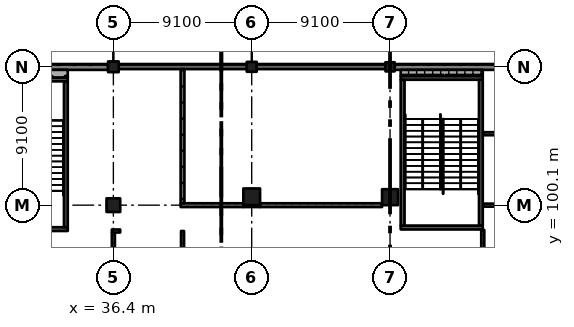
"""IFC4 building model, lengths in metres.
Left out: names, types, materials, properties, quantities, classifications, styles, units other than length and angle.
Written with IfcOpenShell. Run it as: python <this file> out.ifc"""

import sys

from ifc_helpers import new_model, si_unit, direction, frame, frame_2d, origin, origin_2d, place, context, subcontext, project, spatial, rectangle, extrude, element, fill, save


model = new_model("IFC4")
c1 = context("Model", 3, precision=1e-05, world=origin(), true_north=direction((0.0, 1.0)))
c2 = subcontext(c1, "Body", "Model", "MODEL_VIEW")
j1 = project(units=[si_unit("LENGTHUNIT", "METRE"), si_unit("PLANEANGLEUNIT", "RADIAN")], contexts=[c1])
p1 = place(None, origin())
s1 = spatial("IfcSite", under=j1, at=p1, CompositionType="ELEMENT")
p2 = place(p1, origin())
s2 = spatial("IfcBuilding", under=s1, at=p2, CompositionType="ELEMENT")
p3 = place(p2, origin())
s3 = spatial("IfcBuildingStorey", under=s2, at=p3, CompositionType="ELEMENT", Elevation=0.0)
p4 = place(p3, frame((36.4, 100.1, -0.4), z_axis=(0.0, 0.0, 1.0), x_axis=(1.0, 0.0, 0.0)))
e1 = element("IfcColumn", 1, at=p4, inside=s3, PredefinedType="COLUMN", context=c2, shape_type="SweptSolid", body=[
    extrude(rectangle(XDim=0.9, YDim=0.9, at=origin_2d()), origin(), (0.0, 0.0, 1.0), 6.77),
])
p5 = place(p3, frame((36.4, 109.2, -0.4), z_axis=(0.0, 0.0, 1.0), x_axis=(1.0, 0.0, 0.0)))
e2 = element("IfcColumn", 2, at=p5, inside=s3, PredefinedType="COLUMN", context=c2, shape_type="SweptSolid", body=[
    extrude(rectangle(XDim=0.7, YDim=0.7, at=origin_2d()), origin(), (0.0, 0.0, 1.0), 6.77),
])
p6 = place(p3, frame((45.5, 100.65, -0.4), z_axis=(0.0, 0.0, 1.0), x_axis=(1.0, 0.0, 0.0)))
e3 = element("IfcColumn", 3, at=p6, inside=s3, PredefinedType="COLUMN", context=c2, shape_type="SweptSolid", body=[
    extrude(rectangle(XDim=1.1, YDim=1.1, at=origin_2d()), origin(), (0.0, 0.0, 1.0), 6.77),
])
p7 = place(p3, frame((45.5, 109.2, -0.4), z_axis=(0.0, 0.0, 1.0), x_axis=(1.0, 0.0, 0.0)))
e4 = element("IfcColumn", 4, at=p7, inside=s3, PredefinedType="COLUMN", context=c2, shape_type="SweptSolid", body=[
    extrude(rectangle(XDim=0.65, YDim=0.65, at=origin_2d()), origin(), (0.0, 0.0, 1.0), 6.77),
])
p8 = place(p3, frame((54.6, 100.625, -0.4), z_axis=(0.0, 0.0, 1.0), x_axis=(1.0, 0.0, 0.0)))
e5 = element("IfcColumn", 5, at=p8, inside=s3, PredefinedType="COLUMN", context=c2, shape_type="SweptSolid", body=[
    extrude(rectangle(XDim=1.05, YDim=1.05, at=origin_2d()), origin(), (0.0, 0.0, 1.0), 6.77),
])
p9 = place(p3, frame((54.6, 109.2, -0.4), z_axis=(0.0, 0.0, 1.0), x_axis=(1.0, 0.0, 0.0)))
e6 = element("IfcColumn", 6, at=p9, inside=s3, PredefinedType="COLUMN", context=c2, shape_type="SweptSolid", body=[
    extrude(rectangle(XDim=0.6, YDim=0.6, at=origin_2d()), origin(), (0.0, 0.0, 1.0), 6.77),
])
p10 = place(p3, frame((33.4, 98.525, -0.4), z_axis=(0.0, 0.0, 1.0), x_axis=(-1.0, 0.0, 0.0)))
e7 = element("IfcWall", 7, at=p10, inside=s3, PredefinedType="SHEAR", context=c2, shape_type="SweptSolid", body=[
    extrude(rectangle(XDim=5.4, YDim=0.25, at=frame_2d((2.7, 0.0))), origin(), (0.0, 0.0, 1.0), 6.77),
])
p11 = place(p10, frame((1.5, 0.0, 0.4)))
e8 = element("IfcOpeningElement", 8, at=p11, cuts=e7, PredefinedType="OPENING", context=c2, shape_type="SweptSolid", body=[
    extrude(rectangle(XDim=2.4, YDim=2.1, at=frame_2d((1.2, 1.05))), frame((0.0, 0.135, 0.0), z_axis=(0.0, -1.0, 0.0), x_axis=(1.0, 0.0, 0.0)), (0.0, 0.0, 1.0), 0.27),
])
p12 = place(p3, frame((33.4, 108.375, -0.4), z_axis=(0.0, 0.0, 1.0), x_axis=(-1.0, 0.0, 0.0)))
e9 = element("IfcWall", 9, at=p12, inside=s3, PredefinedType="SHEAR", context=c2, shape_type="SweptSolid", body=[
    extrude(rectangle(XDim=5.4, YDim=0.25, at=frame_2d((2.7, 0.0))), origin(), (0.0, 0.0, 1.0), 6.77),
])
p13 = place(p3, frame((33.275, 108.25, -0.4), z_axis=(0.0, 0.0, 1.0), x_axis=(0.0, -1.0, 0.0)))
e10 = element("IfcWall", 10, at=p13, inside=s3, PredefinedType="SHEAR", context=c2, shape_type="SweptSolid", body=[
    extrude(rectangle(XDim=9.6, YDim=0.25, at=frame_2d((4.8, 0.0))), origin(), (0.0, 0.0, 1.0), 6.77),
])
p14 = place(p13, frame((7.95, 0.0, 0.4)))
e11 = element("IfcOpeningElement", 11, at=p14, cuts=e10, PredefinedType="OPENING", context=c2, shape_type="SweptSolid", body=[
    extrude(rectangle(XDim=1.2, YDim=2.1, at=frame_2d((0.6, 1.05))), frame((0.0, 0.135, 0.0), z_axis=(0.0, -1.0, 0.0), x_axis=(1.0, 0.0, 0.0)), (0.0, 0.0, 1.0), 0.27),
])
p15 = place(p3, frame((60.7, 98.625, -0.4), z_axis=(0.0, 0.0, 1.0), x_axis=(-1.0, 0.0, 0.0)))
e12 = element("IfcWall", 12, at=p15, inside=s3, PredefinedType="SHEAR", context=c2, shape_type="SweptSolid", body=[
    extrude(rectangle(XDim=5.4, YDim=0.25, at=frame_2d((2.7, 0.0))), origin(), (0.0, 0.0, 1.0), 6.77),
])
p16 = place(p15, frame((1.5, 0.0, 0.4)))
e13 = element("IfcOpeningElement", 13, at=p16, cuts=e12, PredefinedType="OPENING", context=c2, shape_type="SweptSolid", body=[
    extrude(rectangle(XDim=2.4, YDim=2.1, at=frame_2d((1.2, 1.05))), frame((0.0, 0.135, 0.0), z_axis=(0.0, -1.0, 0.0), x_axis=(1.0, 0.0, 0.0)), (0.0, 0.0, 1.0), 0.27),
])
p17 = place(p3, frame((60.7, 108.475, -0.4), z_axis=(0.0, 0.0, 1.0), x_axis=(-1.0, 0.0, 0.0)))
e14 = element("IfcWall", 14, at=p17, inside=s3, PredefinedType="SHEAR", context=c2, shape_type="SweptSolid", body=[
    extrude(rectangle(XDim=5.4, YDim=0.25, at=frame_2d((2.7, 0.0))), origin(), (0.0, 0.0, 1.0), 6.77),
])
for number, where, z_axis, x_axis in (
    (15, (55.425, 108.35, -0.4), (0.0, 0.0, 1.0), (0.0, -1.0, 0.0)),
    (16, (60.575, 108.35, -0.4), (0.0, 0.0, 1.0), (0.0, -1.0, 0.0)),
):
    element("IfcWall", number, at=place(p3, frame(where, z_axis=z_axis, x_axis=x_axis)), inside=s3, PredefinedType="SHEAR", context=c2, shape_type="SweptSolid", body=[
        extrude(rectangle(XDim=9.6, YDim=0.25, at=frame_2d((4.8, 0.0))), origin(), (0.0, 0.0, 1.0), 6.77),
    ])
p18 = place(p3, frame((63.375, 109.175, 0.0), z_axis=(0.0, 0.0, 1.0), x_axis=(-1.0, 0.0, 0.0)))
e17 = element("IfcWall", 17, at=p18, inside=s3, PredefinedType="SOLIDWALL", context=c2, shape_type="SweptSolid", body=[
    extrude(rectangle(XDim=8.475, YDim=0.35, at=frame_2d((4.238, 0.0))), origin(), (0.0, 0.0, 1.0), 5.27),
])
p19 = place(p3, frame((54.3, 109.2, 0.0), z_axis=(0.0, 0.0, 1.0), x_axis=(-1.0, 0.0, 0.0)))
e18 = element("IfcWall", 18, at=p19, inside=s3, PredefinedType="SOLIDWALL", context=c2, shape_type="SweptSolid", body=[
    extrude(rectangle(XDim=8.475, YDim=0.3, at=frame_2d((4.238, 0.0))), origin(), (0.0, 0.0, 1.0), 5.27),
])
p20 = place(p19, frame((0.712, 0.0, 1.0)))
e19 = element("IfcOpeningElement", 19, at=p20, cuts=e18, PredefinedType="OPENING", context=c2, shape_type="SweptSolid", body=[
    extrude(rectangle(XDim=1.8, YDim=1.2, at=frame_2d((0.9, 0.6))), frame((0.0, 0.16, 0.0), z_axis=(0.0, -1.0, 0.0), x_axis=(1.0, 0.0, 0.0)), (0.0, 0.0, 1.0), 0.32),
])
p21 = place(p19, frame((3.337, 0.0, 1.0)))
e20 = element("IfcOpeningElement", 20, at=p21, cuts=e18, PredefinedType="OPENING", context=c2, shape_type="SweptSolid", body=[
    extrude(rectangle(XDim=1.8, YDim=1.2, at=frame_2d((0.9, 0.6))), frame((0.0, 0.16, 0.0), z_axis=(0.0, -1.0, 0.0), x_axis=(1.0, 0.0, 0.0)), (0.0, 0.0, 1.0), 0.32),
])
p22 = place(p19, frame((5.962, 0.0, 1.0)))
e21 = element("IfcOpeningElement", 21, at=p22, cuts=e18, PredefinedType="OPENING", context=c2, shape_type="SweptSolid", body=[
    extrude(rectangle(XDim=1.8, YDim=1.2, at=frame_2d((0.9, 0.6))), frame((0.0, 0.16, 0.0), z_axis=(0.0, -1.0, 0.0), x_axis=(1.0, 0.0, 0.0)), (0.0, 0.0, 1.0), 0.32),
])
p23 = place(p3, frame((45.175, 109.2, 0.0), z_axis=(0.0, 0.0, 1.0), x_axis=(-1.0, 0.0, 0.0)))
e22 = element("IfcWall", 22, at=p23, inside=s3, PredefinedType="SOLIDWALL", context=c2, shape_type="SweptSolid", body=[
    extrude(rectangle(XDim=8.425, YDim=0.3, at=frame_2d((4.212, 0.0))), origin(), (0.0, 0.0, 1.0), 5.27),
])
p24 = place(p23, frame((5.3, 0.0, 0.0)))
e23 = element("IfcOpeningElement", 23, at=p24, cuts=e22, PredefinedType="OPENING", context=c2, shape_type="SweptSolid", body=[
    extrude(rectangle(XDim=1.8, YDim=2.4, at=frame_2d((0.9, 1.2))), frame((0.0, 0.16, 0.0), z_axis=(0.0, -1.0, 0.0), x_axis=(1.0, 0.0, 0.0)), (0.0, 0.0, 1.0), 0.32),
])
p25 = place(p23, frame((1.212, 0.0, 1.0)))
e24 = element("IfcOpeningElement", 24, at=p25, cuts=e22, PredefinedType="OPENING", context=c2, shape_type="SweptSolid", body=[
    extrude(rectangle(XDim=1.8, YDim=1.2, at=frame_2d((0.9, 0.6))), frame((0.0, 0.16, 0.0), z_axis=(0.0, -1.0, 0.0), x_axis=(1.0, 0.0, 0.0)), (0.0, 0.0, 1.0), 0.32),
])
p26 = place(p3, frame((36.05, 109.175, 0.0), z_axis=(0.0, 0.0, 1.0), x_axis=(-1.0, 0.0, 0.0)))
e25 = element("IfcWall", 25, at=p26, inside=s3, PredefinedType="SOLIDWALL", context=c2, shape_type="SweptSolid", body=[
    extrude(rectangle(XDim=8.475, YDim=0.35, at=frame_2d((4.238, 0.0))), origin(), (0.0, 0.0, 1.0), 5.27),
])
p27 = place(p26, frame((0.4, 0.0, 0.0)))
e26 = element("IfcOpeningElement", 26, at=p27, cuts=e25, PredefinedType="OPENING", context=c2, shape_type="SweptSolid", body=[
    extrude(rectangle(XDim=2.1, YDim=2.4, at=frame_2d((1.05, 1.2))), frame((0.0, 0.185, 0.0), z_axis=(0.0, -1.0, 0.0), x_axis=(1.0, 0.0, 0.0)), (0.0, 0.0, 1.0), 0.37),
])
p28 = place(p3, frame((28.0, 108.75, 0.0), z_axis=(0.0, 0.0, 1.0), x_axis=(1.0, 0.0, 0.0)))
e27 = element("IfcWall", 27, at=p28, inside=s3, PredefinedType="SOLIDWALL", context=c2, shape_type="SweptSolid", body=[
    extrude(rectangle(XDim=5.4, YDim=0.5, at=frame_2d((2.7, 0.0))), origin(), (0.0, 0.0, 1.0), 6.37),
])
p29 = place(p3, frame((55.3, 108.8, 0.0), z_axis=(0.0, 0.0, 1.0), x_axis=(1.0, 0.0, 0.0)))
e28 = element("IfcWall", 28, at=p29, inside=s3, PredefinedType="SOLIDWALL", context=c2, shape_type="SweptSolid", body=[
    extrude(rectangle(XDim=5.4, YDim=0.4, at=frame_2d((2.7, 0.0))), origin(), (0.0, 0.0, 1.0), 6.02),
])
p30 = place(p3, frame((36.4, 98.3, 0.0), z_axis=(0.0, 0.0, 1.0), x_axis=(0.0, -1.0, 0.0)))
e29 = element("IfcWall", 29, at=p30, inside=s3, PredefinedType="PARTITIONING", context=c2, shape_type="SweptSolid", body=[
    extrude(rectangle(XDim=6.825, YDim=0.2, at=frame_2d((3.413, 0.0))), origin(), (0.0, 0.0, 1.0), 5.32),
])
p31 = place(p30, frame((0.85, 0.0, 0.0)))
e30 = element("IfcOpeningElement", 30, at=p31, cuts=e29, PredefinedType="OPENING", context=c2, shape_type="SweptSolid", body=[
    extrude(rectangle(XDim=1.8, YDim=2.4, at=frame_2d((0.9, 1.2))), frame((0.0, 0.11, 0.0), z_axis=(0.0, -1.0, 0.0), x_axis=(1.0, 0.0, 0.0)), (0.0, 0.0, 1.0), 0.22),
])
p32 = place(p30, frame((4.25, 0.0, 0.0)))
e31 = element("IfcOpeningElement", 31, at=p32, cuts=e29, PredefinedType="OPENING", context=c2, shape_type="SweptSolid", body=[
    extrude(rectangle(XDim=1.8, YDim=2.4, at=frame_2d((0.9, 1.2))), frame((0.0, 0.11, 0.0), z_axis=(0.0, -1.0, 0.0), x_axis=(1.0, 0.0, 0.0)), (0.0, 0.0, 1.0), 0.22),
])
p33 = place(p3, frame((36.85, 98.4, 0.0), z_axis=(0.0, 0.0, 1.0), x_axis=(-1.0, 0.0, 0.0)))
e32 = element("IfcWall", 32, at=p33, inside=s3, PredefinedType="PARTITIONING", context=c2, shape_type="SweptSolid", body=[
    extrude(rectangle(XDim=0.55, YDim=0.2, at=frame_2d((0.275, 0.0))), origin(), (0.0, 0.0, 1.0), 6.02),
])
p34 = place(p3, frame((40.825, 100.1, 0.0), z_axis=(0.0, 0.0, 1.0), x_axis=(1.0, 0.0, 0.0)))
e33 = element("IfcWall", 33, at=p34, inside=s3, PredefinedType="SOLIDWALL", context=c2, shape_type="SweptSolid", body=[
    extrude(rectangle(XDim=4.125, YDim=0.25, at=frame_2d((2.062, 0.0))), origin(), (0.0, 0.0, 1.0), 5.32),
])
p35 = place(p3, frame((40.95, 98.4, 0.0), z_axis=(0.0, 0.0, 1.0), x_axis=(0.0, -1.0, 0.0)))
e34 = element("IfcWall", 34, at=p35, inside=s3, PredefinedType="PARTITIONING", context=c2, shape_type="SweptSolid", body=[
    extrude(rectangle(XDim=7.3, YDim=0.2, at=frame_2d((3.65, 0.0))), origin(), (0.0, 0.0, 1.0), 6.02),
])
p36 = place(p35, frame((0.95, 0.0, 0.0)))
e35 = element("IfcOpeningElement", 35, at=p36, cuts=e34, PredefinedType="OPENING", context=c2, shape_type="SweptSolid", body=[
    extrude(rectangle(XDim=1.8, YDim=2.4, at=frame_2d((0.9, 1.2))), frame((0.0, 0.11, 0.0), z_axis=(0.0, -1.0, 0.0), x_axis=(1.0, 0.0, 0.0)), (0.0, 0.0, 1.0), 0.22),
])
p37 = place(p35, frame((4.55, 0.0, 0.0)))
e36 = element("IfcOpeningElement", 36, at=p37, cuts=e34, PredefinedType="OPENING", context=c2, shape_type="SweptSolid", body=[
    extrude(rectangle(XDim=1.8, YDim=2.4, at=frame_2d((0.9, 1.2))), frame((0.0, 0.11, 0.0), z_axis=(0.0, -1.0, 0.0), x_axis=(1.0, 0.0, 0.0)), (0.0, 0.0, 1.0), 0.22),
])
p38 = place(p3, frame((40.95, 109.05, 0.0), z_axis=(0.0, 0.0, 1.0), x_axis=(0.0, -1.0, 0.0)))
e37 = element("IfcWall", 37, at=p38, inside=s3, PredefinedType="SOLIDWALL", context=c2, shape_type="SweptSolid", body=[
    extrude(rectangle(XDim=8.825, YDim=0.25, at=frame_2d((4.413, 0.0))), origin(), (0.0, 0.0, 1.0), 6.02),
])
p39 = place(p3, frame((60.7, 98.47, 0.0), z_axis=(0.0, 0.0, 1.0), x_axis=(0.0, -1.0, 0.0)))
e38 = element("IfcWall", 38, at=p39, inside=s3, PredefinedType="PARTITIONING", context=c2, shape_type="SweptSolid", body=[
    extrude(rectangle(XDim=7.37, YDim=0.2, at=frame_2d((3.685, 0.0))), origin(), (0.0, 0.0, 1.0), 6.02),
])
p40 = place(p39, frame((2.15, 0.0, 0.0)))
e39 = element("IfcOpeningElement", 39, at=p40, cuts=e38, PredefinedType="OPENING", context=c2, shape_type="SweptSolid", body=[
    extrude(rectangle(XDim=3.0, YDim=2.4, at=frame_2d((1.5, 1.2))), frame((0.0, 0.11, 0.0), z_axis=(0.0, -1.0, 0.0), x_axis=(1.0, 0.0, 0.0)), (0.0, 0.0, 1.0), 0.22),
])
p41 = place(p3, frame((60.73, 100.1, 0.0), z_axis=(0.0, 0.0, 1.0), x_axis=(1.0, 0.0, 0.0)))
e40 = element("IfcWall", 40, at=p41, inside=s3, PredefinedType="PARTITIONING", context=c2, shape_type="SweptSolid", body=[
    extrude(rectangle(XDim=2.42, YDim=0.2, at=frame_2d((1.21, 0.0))), origin(), (0.0, 0.0, 1.0), 5.57),
])
p42 = place(p41, frame((0.55, 0.0, 0.0)))
e41 = element("IfcOpeningElement", 41, at=p42, cuts=e40, PredefinedType="OPENING", context=c2, shape_type="SweptSolid", body=[
    extrude(rectangle(XDim=1.8, YDim=2.4, at=frame_2d((0.9, 1.2))), frame((0.0, 0.11, 0.0), z_axis=(0.0, -1.0, 0.0), x_axis=(1.0, 0.0, 0.0)), (0.0, 0.0, 1.0), 0.22),
])
p43 = place(p3, frame((60.73, 104.8, 0.0), z_axis=(0.0, 0.0, 1.0), x_axis=(1.0, 0.0, 0.0)))
e42 = element("IfcWall", 42, at=p43, inside=s3, PredefinedType="PARTITIONING", context=c2, shape_type="SweptSolid", body=[
    extrude(rectangle(XDim=21.84, YDim=0.2, at=frame_2d((10.92, 0.0))), origin(), (0.0, 0.0, 1.0), 6.02),
])
p44 = place(p43, frame((0.65, 0.0, 0.0)))
e43 = element("IfcOpeningElement", 43, at=p44, cuts=e42, PredefinedType="OPENING", context=c2, shape_type="SweptSolid", body=[
    extrude(rectangle(XDim=1.8, YDim=2.4, at=frame_2d((0.9, 1.2))), frame((0.0, 0.11, 0.0), z_axis=(0.0, -1.0, 0.0), x_axis=(1.0, 0.0, 0.0)), (0.0, 0.0, 1.0), 0.22),
])
p45 = place(p43, frame((3.75, 0.0, 0.0)))
e44 = element("IfcOpeningElement", 44, at=p45, cuts=e42, PredefinedType="OPENING", context=c2, shape_type="SweptSolid", body=[
    extrude(rectangle(XDim=1.8, YDim=2.4, at=frame_2d((0.9, 1.2))), frame((0.0, 0.11, 0.0), z_axis=(0.0, -1.0, 0.0), x_axis=(1.0, 0.0, 0.0)), (0.0, 0.0, 1.0), 0.22),
])
p46 = place(p43, frame((6.95, 0.0, 0.0)))
e45 = element("IfcOpeningElement", 45, at=p46, cuts=e42, PredefinedType="OPENING", context=c2, shape_type="SweptSolid", body=[
    extrude(rectangle(XDim=1.8, YDim=2.4, at=frame_2d((0.9, 1.2))), frame((0.0, 0.11, 0.0), z_axis=(0.0, -1.0, 0.0), x_axis=(1.0, 0.0, 0.0)), (0.0, 0.0, 1.0), 0.22),
])
p47 = place(p43, frame((10.05, 0.0, 0.0)))
e46 = element("IfcOpeningElement", 46, at=p47, cuts=e42, PredefinedType="OPENING", context=c2, shape_type="SweptSolid", body=[
    extrude(rectangle(XDim=1.8, YDim=2.4, at=frame_2d((0.9, 1.2))), frame((0.0, 0.11, 0.0), z_axis=(0.0, -1.0, 0.0), x_axis=(1.0, 0.0, 0.0)), (0.0, 0.0, 1.0), 0.22),
])
p48 = place(p43, frame((13.15, 0.0, 0.0)))
e47 = element("IfcOpeningElement", 47, at=p48, cuts=e42, PredefinedType="OPENING", context=c2, shape_type="SweptSolid", body=[
    extrude(rectangle(XDim=1.8, YDim=2.4, at=frame_2d((0.9, 1.2))), frame((0.0, 0.11, 0.0), z_axis=(0.0, -1.0, 0.0), x_axis=(1.0, 0.0, 0.0)), (0.0, 0.0, 1.0), 0.22),
])
p49 = place(p43, frame((16.25, 0.0, 0.0)))
e48 = element("IfcOpeningElement", 48, at=p49, cuts=e42, PredefinedType="OPENING", context=c2, shape_type="SweptSolid", body=[
    extrude(rectangle(XDim=1.8, YDim=2.4, at=frame_2d((0.9, 1.2))), frame((0.0, 0.11, 0.0), z_axis=(0.0, -1.0, 0.0), x_axis=(1.0, 0.0, 0.0)), (0.0, 0.0, 1.0), 0.22),
])
p50 = place(p43, frame((19.35, 0.0, 0.0)))
e49 = element("IfcOpeningElement", 49, at=p50, cuts=e42, PredefinedType="OPENING", context=c2, shape_type="SweptSolid", body=[
    extrude(rectangle(XDim=1.8, YDim=2.4, at=frame_2d((0.9, 1.2))), frame((0.0, 0.11, 0.0), z_axis=(0.0, -1.0, 0.0), x_axis=(1.0, 0.0, 0.0)), (0.0, 0.0, 1.0), 0.22),
])
p51 = place(p3, frame((44.95, 100.1, 0.0), z_axis=(0.0, 0.0, 1.0), x_axis=(1.0, 0.0, 0.0)))
e50 = element("IfcWall", 50, at=p51, inside=s3, PredefinedType="SOLIDWALL", context=c2, shape_type="SweptSolid", body=[
    extrude(rectangle(XDim=1.1, YDim=0.25, at=frame_2d((0.55, 0.0))), origin(), (0.0, 0.0, 1.0), 6.02),
])
p52 = place(p3, frame((46.05, 100.1, 0.0), z_axis=(0.0, 0.0, 1.0), x_axis=(1.0, 0.0, 0.0)))
e51 = element("IfcWall", 51, at=p52, inside=s3, PredefinedType="SOLIDWALL", context=c2, shape_type="SweptSolid", body=[
    extrude(rectangle(XDim=8.025, YDim=0.25, at=frame_2d((4.012, 0.0))), origin(), (0.0, 0.0, 1.0), 5.32),
])
p53 = place(p52, frame((0.525, 0.0, 0.0)))
e52 = element("IfcOpeningElement", 52, at=p53, cuts=e51, PredefinedType="OPENING", context=c2, shape_type="SweptSolid", body=[
    extrude(rectangle(XDim=1.8, YDim=2.1, at=frame_2d((0.9, 1.05))), frame((0.0, 0.135, 0.0), z_axis=(0.0, -1.0, 0.0), x_axis=(1.0, 0.0, 0.0)), (0.0, 0.0, 1.0), 0.27),
])
p54 = place(p20, origin())
e53 = element("IfcWindow", 53, at=p54, inside=s3, PartitioningType="SINGLE_PANEL", PredefinedType="WINDOW", context=c2, shape_type="SweptSolid", body=[
    extrude(rectangle(XDim=1.8, YDim=1.2, at=frame_2d((0.9, 0.6))), frame((0.0, 0.03, 0.0), z_axis=(0.0, -1.0, 0.0), x_axis=(1.0, 0.0, 0.0)), (0.0, 0.0, 1.0), 0.06),
])
fill(e19, e53)
p55 = place(p21, origin())
e54 = element("IfcWindow", 54, at=p55, inside=s3, PartitioningType="SINGLE_PANEL", PredefinedType="WINDOW", context=c2, shape_type="SweptSolid", body=[
    extrude(rectangle(XDim=1.8, YDim=1.2, at=frame_2d((0.9, 0.6))), frame((0.0, 0.03, 0.0), z_axis=(0.0, -1.0, 0.0), x_axis=(1.0, 0.0, 0.0)), (0.0, 0.0, 1.0), 0.06),
])
fill(e20, e54)
p56 = place(p22, origin())
e55 = element("IfcWindow", 55, at=p56, inside=s3, PartitioningType="SINGLE_PANEL", PredefinedType="WINDOW", context=c2, shape_type="SweptSolid", body=[
    extrude(rectangle(XDim=1.8, YDim=1.2, at=frame_2d((0.9, 0.6))), frame((0.0, 0.03, 0.0), z_axis=(0.0, -1.0, 0.0), x_axis=(1.0, 0.0, 0.0)), (0.0, 0.0, 1.0), 0.06),
])
fill(e21, e55)
p57 = place(p24, frame((1.8, 0.0, 0.0), z_axis=(0.0, 0.0, 1.0), x_axis=(-1.0, 0.0, 0.0)))
e56 = element("IfcDoor", 56, at=p57, inside=s3, OperationType="DOUBLE_DOOR_SINGLE_SWING", PredefinedType="DOOR", context=c2, shape_type="SweptSolid", body=[
    extrude(rectangle(XDim=1.8, YDim=2.4, at=frame_2d((0.9, 1.2))), frame((0.0, 0.025, 0.0), z_axis=(0.0, -1.0, 0.0), x_axis=(1.0, 0.0, 0.0)), (0.0, 0.0, 1.0), 0.05),
])
fill(e23, e56)
p58 = place(p25, origin())
e57 = element("IfcWindow", 57, at=p58, inside=s3, PartitioningType="SINGLE_PANEL", PredefinedType="WINDOW", context=c2, shape_type="SweptSolid", body=[
    extrude(rectangle(XDim=1.8, YDim=1.2, at=frame_2d((0.9, 0.6))), frame((0.0, 0.03, 0.0), z_axis=(0.0, -1.0, 0.0), x_axis=(1.0, 0.0, 0.0)), (0.0, 0.0, 1.0), 0.06),
])
fill(e24, e57)
p59 = place(p27, frame((2.1, 0.0, 0.0), z_axis=(0.0, 0.0, 1.0), x_axis=(-1.0, 0.0, 0.0)))
e58 = element("IfcDoor", 58, at=p59, inside=s3, OperationType="DOUBLE_DOOR_SINGLE_SWING", PredefinedType="DOOR", context=c2, shape_type="SweptSolid", body=[
    extrude(rectangle(XDim=2.1, YDim=2.4, at=frame_2d((1.05, 1.2))), frame((0.0, 0.025, 0.0), z_axis=(0.0, -1.0, 0.0), x_axis=(1.0, 0.0, 0.0)), (0.0, 0.0, 1.0), 0.05),
])
fill(e26, e58)
p60 = place(p53, origin())
e59 = element("IfcDoor", 59, at=p60, inside=s3, OperationType="DOUBLE_DOOR_SINGLE_SWING", PredefinedType="DOOR", context=c2, shape_type="SweptSolid", body=[
    extrude(rectangle(XDim=1.8, YDim=2.1, at=frame_2d((0.9, 1.05))), frame((0.0, 0.025, 0.0), z_axis=(0.0, -1.0, 0.0), x_axis=(1.0, 0.0, 0.0)), (0.0, 0.0, 1.0), 0.05),
])
fill(e52, e59)
p61 = place(p31, origin())
e60 = element("IfcDoor", 60, at=p61, inside=s3, OperationType="DOUBLE_DOOR_SINGLE_SWING", PredefinedType="DOOR", context=c2, shape_type="SweptSolid", body=[
    extrude(rectangle(XDim=1.8, YDim=2.4, at=frame_2d((0.9, 1.2))), frame((0.0, 0.025, 0.0), z_axis=(0.0, -1.0, 0.0), x_axis=(1.0, 0.0, 0.0)), (0.0, 0.0, 1.0), 0.05),
])
fill(e30, e60)
p62 = place(p36, origin())
e61 = element("IfcDoor", 61, at=p62, inside=s3, OperationType="DOUBLE_DOOR_SINGLE_SWING", PredefinedType="DOOR", context=c2, shape_type="SweptSolid", body=[
    extrude(rectangle(XDim=1.8, YDim=2.4, at=frame_2d((0.9, 1.2))), frame((0.0, 0.025, 0.0), z_axis=(0.0, -1.0, 0.0), x_axis=(1.0, 0.0, 0.0)), (0.0, 0.0, 1.0), 0.05),
])
fill(e35, e61)
p63 = place(p42, origin())
e62 = element("IfcDoor", 62, at=p63, inside=s3, OperationType="DOUBLE_DOOR_SINGLE_SWING", PredefinedType="DOOR", context=c2, shape_type="SweptSolid", body=[
    extrude(rectangle(XDim=1.8, YDim=2.4, at=frame_2d((0.9, 1.2))), frame((0.0, 0.025, 0.0), z_axis=(0.0, -1.0, 0.0), x_axis=(1.0, 0.0, 0.0)), (0.0, 0.0, 1.0), 0.05),
])
fill(e41, e62)
p64 = place(p44, origin())
e63 = element("IfcDoor", 63, at=p64, inside=s3, OperationType="DOUBLE_DOOR_SINGLE_SWING", PredefinedType="DOOR", context=c2, shape_type="SweptSolid", body=[
    extrude(rectangle(XDim=1.8, YDim=2.4, at=frame_2d((0.9, 1.2))), frame((0.0, 0.025, 0.0), z_axis=(0.0, -1.0, 0.0), x_axis=(1.0, 0.0, 0.0)), (0.0, 0.0, 1.0), 0.05),
])
fill(e43, e63)
p65 = place(p16, origin())
e64 = element("IfcDoor", 64, at=p65, inside=s3, OperationType="DOUBLE_DOOR_SINGLE_SWING", PredefinedType="DOOR", context=c2, shape_type="SweptSolid", body=[
    extrude(rectangle(XDim=2.4, YDim=2.1, at=frame_2d((1.2, 1.05))), frame((0.0, 0.025, 0.0), z_axis=(0.0, -1.0, 0.0), x_axis=(1.0, 0.0, 0.0)), (0.0, 0.0, 1.0), 0.05),
])
fill(e13, e64)
p66 = place(p14, origin())
e65 = element("IfcDoor", 65, at=p66, inside=s3, OperationType="SINGLE_SWING_LEFT", PredefinedType="DOOR", context=c2, shape_type="SweptSolid", body=[
    extrude(rectangle(XDim=1.2, YDim=2.1, at=frame_2d((0.6, 1.05))), frame((0.0, 0.025, 0.0), z_axis=(0.0, -1.0, 0.0), x_axis=(1.0, 0.0, 0.0)), (0.0, 0.0, 1.0), 0.05),
])
fill(e11, e65)
save(model, sys.argv[1])
